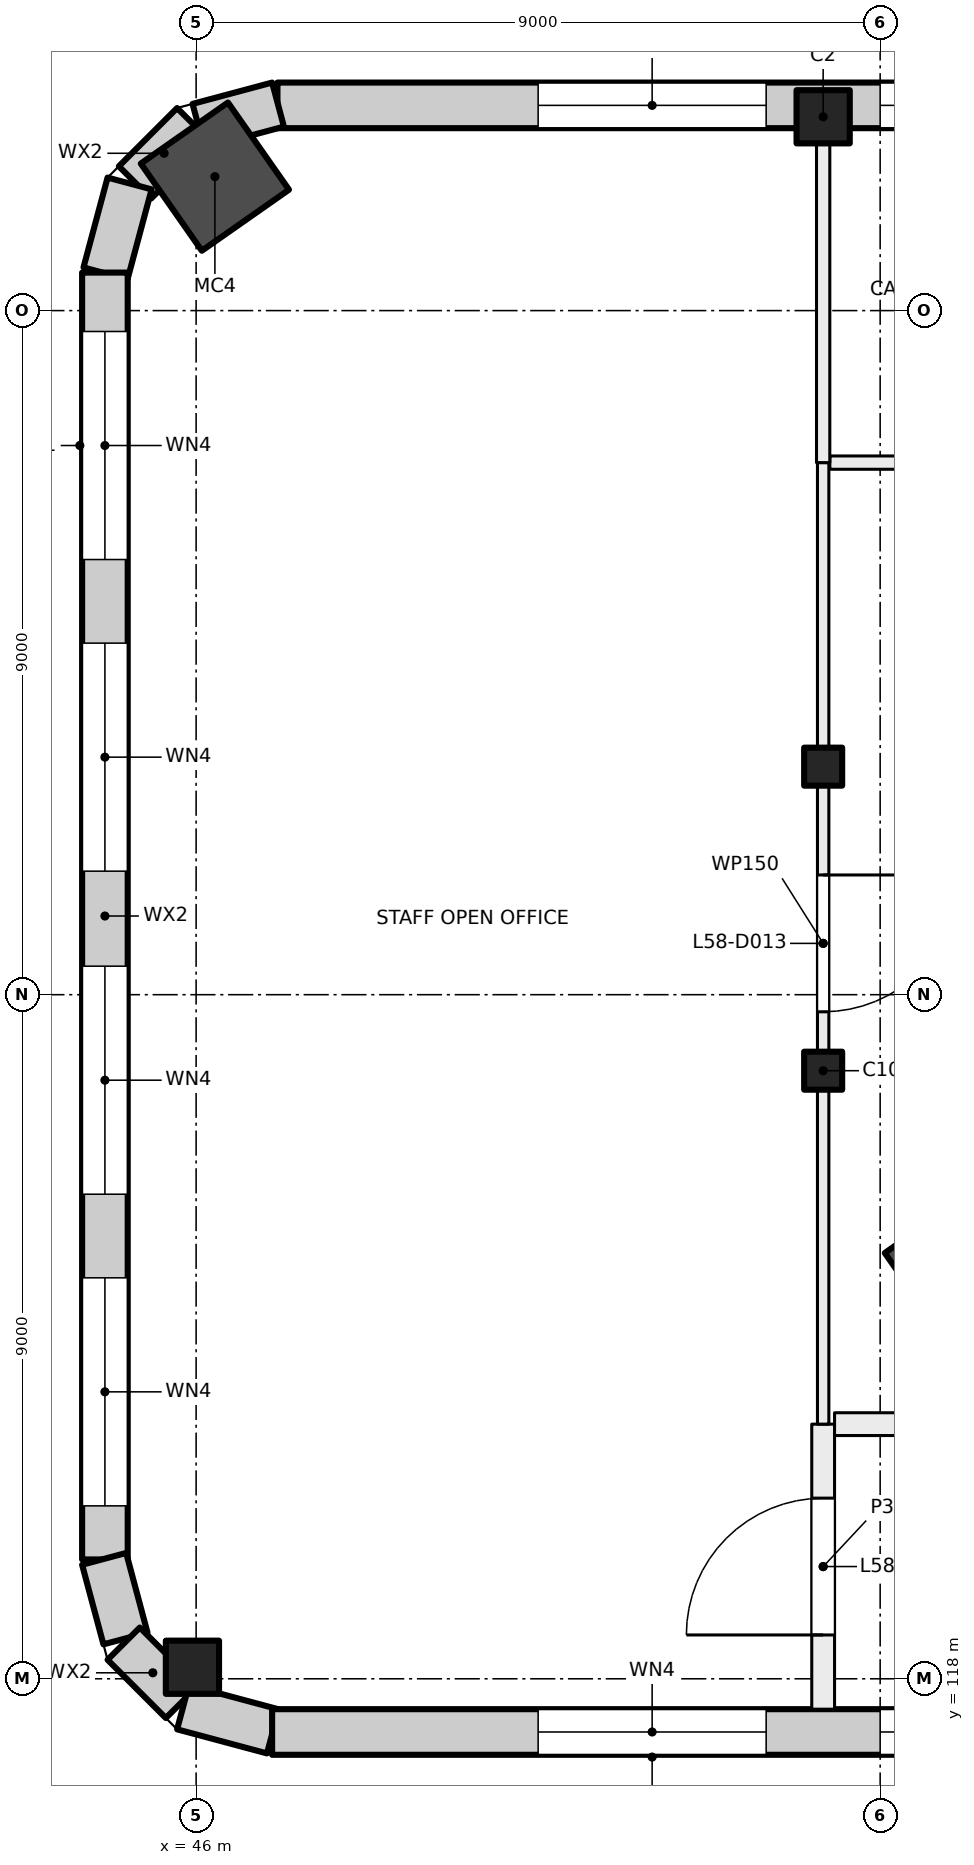
"""IFC4 building model, lengths in metres.
Left out: names, types, materials, properties, quantities, classifications, styles, units other than length and angle.
Written with IfcOpenShell. Run it as: python <this file> out.ifc"""

import sys

from ifc_helpers import new_model, si_unit, direction, frame, frame_2d, origin, origin_2d, place, context, subcontext, project, spatial, rectangle, hollow_rectangle, extrude, element, fill, save


model = new_model("IFC4")
c1 = context("Model", 3, precision=1e-05, world=origin(), true_north=direction((0.0, 1.0)))
c2 = subcontext(c1, "Body", "Model", "MODEL_VIEW")
j1 = project(units=[si_unit("LENGTHUNIT", "METRE"), si_unit("PLANEANGLEUNIT", "RADIAN")], contexts=[c1])
p1 = place(None, origin())
s1 = spatial("IfcSite", under=j1, at=p1, CompositionType="ELEMENT")
p2 = place(p1, origin())
s2 = spatial("IfcBuilding", under=s1, at=p2, CompositionType="ELEMENT")
p3 = place(p2, frame((0.0, 0.0, 245.5)))
s3 = spatial("IfcBuildingStorey", under=s2, at=p3, CompositionType="ELEMENT", Elevation=245.5)
for number, where, z_axis, x_axis in (
    (1, (46.247, 137.762, 0.0), (0.0, 0.0, 1.0), (0.574, -0.819, 0.0)),
    (2, (56.036, 123.43, 0.0), (0.0, 0.0, 1.0), (0.574, -0.819, 0.0)),
):
    element("IfcColumn", number, at=place(p3, frame(where, z_axis=z_axis, x_axis=x_axis)), inside=s3, PredefinedType="COLUMN", context=c2, shape_type="SweptSolid", body=[
        extrude(hollow_rectangle(XDim=1.4, YDim=1.4, WallThickness=0.025, at=origin_2d()), origin(), (0.0, 0.0, 1.0), 4.0),
    ])
for number, where, z_axis, x_axis in (
    (3, (54.25, 130.0, 0.0), (0.0, 0.0, 1.0), (1.0, 0.0, 0.0)),
    (4, (54.25, 126.0, 0.0), (0.0, 0.0, 1.0), (1.0, 0.0, 0.0)),
):
    element("IfcColumn", number, at=place(p3, frame(where, z_axis=z_axis, x_axis=x_axis)), inside=s3, PredefinedType="COLUMN", context=c2, shape_type="SweptSolid", body=[
        extrude(rectangle(XDim=0.5, YDim=0.5, at=origin_2d()), origin(), (0.0, 0.0, 1.0), 4.0),
    ])
for number, where, z_axis, x_axis in (
    (5, (54.25, 138.55, 0.0), (0.0, 0.0, 1.0), (1.0, 0.0, 0.0)),
    (6, (45.952, 118.152, 0.0), (0.0, 0.0, 1.0), (1.0, 0.0, 0.0)),
):
    element("IfcColumn", number, at=place(p3, frame(where, z_axis=z_axis, x_axis=x_axis)), inside=s3, PredefinedType="COLUMN", context=c2, shape_type="SweptSolid", body=[
        extrude(rectangle(XDim=0.7, YDim=0.7, at=origin_2d()), origin(), (0.0, 0.0, 1.0), 4.0),
    ])
p4 = place(p3, frame((47.07, 138.7, 0.0), z_axis=(0.0, 0.0, 1.0), x_axis=(1.0, 0.0, 0.0)))
e7 = element("IfcWall", 7, at=p4, inside=s3, PredefinedType="SOLIDWALL", context=c2, shape_type="SweptSolid", body=[
    extrude(rectangle(XDim=43.91, YDim=0.6, at=frame_2d((21.955, 0.0))), origin(), (0.0, 0.0, 1.0), 3.625),
])
p5 = place(p4, frame((3.43, 0.0, 0.9)))
e8 = element("IfcOpeningElement", 8, at=p5, cuts=e7, PredefinedType="OPENING", context=c2, shape_type="SweptSolid", body=[
    extrude(rectangle(XDim=3.0, YDim=2.4, at=frame_2d((1.5, 1.2))), frame((0.0, 0.31, 0.0), z_axis=(0.0, -1.0, 0.0), x_axis=(1.0, 0.0, 0.0)), (0.0, 0.0, 1.0), 0.62),
])
p6 = place(p4, frame((7.93, 0.0, 0.9)))
e9 = element("IfcOpeningElement", 9, at=p6, cuts=e7, PredefinedType="OPENING", context=c2, shape_type="SweptSolid", body=[
    extrude(rectangle(XDim=3.0, YDim=2.4, at=frame_2d((1.5, 1.2))), frame((0.0, 0.31, 0.0), z_axis=(0.0, -1.0, 0.0), x_axis=(1.0, 0.0, 0.0)), (0.0, 0.0, 1.0), 0.62),
])
p7 = place(p4, frame((12.43, 0.0, 0.9)))
e10 = element("IfcOpeningElement", 10, at=p7, cuts=e7, PredefinedType="OPENING", context=c2, shape_type="SweptSolid", body=[
    extrude(rectangle(XDim=3.0, YDim=2.4, at=frame_2d((1.5, 1.2))), frame((0.0, 0.31, 0.0), z_axis=(0.0, -1.0, 0.0), x_axis=(1.0, 0.0, 0.0)), (0.0, 0.0, 1.0), 0.62),
])
p8 = place(p4, frame((16.93, 0.0, 0.9)))
e11 = element("IfcOpeningElement", 11, at=p8, cuts=e7, PredefinedType="OPENING", context=c2, shape_type="SweptSolid", body=[
    extrude(rectangle(XDim=3.0, YDim=2.4, at=frame_2d((1.5, 1.2))), frame((0.0, 0.31, 0.0), z_axis=(0.0, -1.0, 0.0), x_axis=(1.0, 0.0, 0.0)), (0.0, 0.0, 1.0), 0.62),
])
p9 = place(p4, frame((21.43, 0.0, 0.9)))
e12 = element("IfcOpeningElement", 12, at=p9, cuts=e7, PredefinedType="OPENING", context=c2, shape_type="SweptSolid", body=[
    extrude(rectangle(XDim=3.0, YDim=2.4, at=frame_2d((1.5, 1.2))), frame((0.0, 0.31, 0.0), z_axis=(0.0, -1.0, 0.0), x_axis=(1.0, 0.0, 0.0)), (0.0, 0.0, 1.0), 0.62),
])
p10 = place(p4, frame((25.93, 0.0, 0.9)))
e13 = element("IfcOpeningElement", 13, at=p10, cuts=e7, PredefinedType="OPENING", context=c2, shape_type="SweptSolid", body=[
    extrude(rectangle(XDim=3.0, YDim=2.4, at=frame_2d((1.5, 1.2))), frame((0.0, 0.31, 0.0), z_axis=(0.0, -1.0, 0.0), x_axis=(1.0, 0.0, 0.0)), (0.0, 0.0, 1.0), 0.62),
])
p11 = place(p4, frame((30.43, 0.0, 0.9)))
e14 = element("IfcOpeningElement", 14, at=p11, cuts=e7, PredefinedType="OPENING", context=c2, shape_type="SweptSolid", body=[
    extrude(rectangle(XDim=3.0, YDim=2.4, at=frame_2d((1.5, 1.2))), frame((0.0, 0.31, 0.0), z_axis=(0.0, -1.0, 0.0), x_axis=(1.0, 0.0, 0.0)), (0.0, 0.0, 1.0), 0.62),
])
p12 = place(p4, frame((34.93, 0.0, 0.9)))
e15 = element("IfcOpeningElement", 15, at=p12, cuts=e7, PredefinedType="OPENING", context=c2, shape_type="SweptSolid", body=[
    extrude(rectangle(XDim=3.0, YDim=2.4, at=frame_2d((1.5, 1.2))), frame((0.0, 0.31, 0.0), z_axis=(0.0, -1.0, 0.0), x_axis=(1.0, 0.0, 0.0)), (0.0, 0.0, 1.0), 0.62),
])
p13 = place(p4, frame((39.43, 0.0, 0.9)))
e16 = element("IfcOpeningElement", 16, at=p13, cuts=e7, PredefinedType="OPENING", context=c2, shape_type="SweptSolid", body=[
    extrude(rectangle(XDim=3.0, YDim=2.4, at=frame_2d((1.5, 1.2))), frame((0.0, 0.31, 0.0), z_axis=(0.0, -1.0, 0.0), x_axis=(1.0, 0.0, 0.0)), (0.0, 0.0, 1.0), 0.62),
])
p14 = place(p3, frame((46.031, 138.43, 0.0), z_axis=(0.0, 0.0, 1.0), x_axis=(0.965939004864, 0.25876985698, 0.0)))
e17 = element("IfcWall", 17, at=p14, inside=s3, PredefinedType="SOLIDWALL", context=c2, shape_type="SweptSolid", body=[
    extrude(rectangle(XDim=1.084, YDim=0.6, at=frame_2d((0.542, 0.0))), origin(), (0.0, 0.0, 1.0), 3.625),
])
p15 = place(p3, frame((45.196, 137.686, 0.0), z_axis=(0.0, 0.0, 1.0), x_axis=(0.707106781187, 0.707106781187, 0.0)))
e18 = element("IfcWall", 18, at=p15, inside=s3, PredefinedType="SOLIDWALL", context=c2, shape_type="SweptSolid", body=[
    extrude(rectangle(XDim=1.084, YDim=0.6, at=frame_2d((0.542, 0.0))), origin(), (0.0, 0.0, 1.0), 3.625),
])
p16 = place(p3, frame((44.808, 136.49, 0.0), z_axis=(0.0, 0.0, 1.0), x_axis=(0.258878975098, 0.965909766102, 0.0)))
e19 = element("IfcWall", 19, at=p16, inside=s3, PredefinedType="SOLIDWALL", context=c2, shape_type="SweptSolid", body=[
    extrude(rectangle(XDim=1.224, YDim=0.6, at=frame_2d((0.612, 0.0))), origin(), (0.0, 0.0, 1.0), 3.625),
])
p17 = place(p3, frame((44.8, 119.57, 0.0), z_axis=(0.0, 0.0, 1.0), x_axis=(0.0, 1.0, 0.0)))
e20 = element("IfcWall", 20, at=p17, inside=s3, PredefinedType="SOLIDWALL", context=c2, shape_type="SweptSolid", body=[
    extrude(rectangle(XDim=16.93, YDim=0.6, at=frame_2d((8.465, 0.0))), origin(), (0.0, 0.0, 1.0), 3.625),
])
p18 = place(p17, frame((0.705, 0.0, 0.9)))
e21 = element("IfcOpeningElement", 21, at=p18, cuts=e20, PredefinedType="OPENING", context=c2, shape_type="SweptSolid", body=[
    extrude(rectangle(XDim=3.0, YDim=2.4, at=frame_2d((1.5, 1.2))), frame((0.0, 0.31, 0.0), z_axis=(0.0, -1.0, 0.0), x_axis=(1.0, 0.0, 0.0)), (0.0, 0.0, 1.0), 0.62),
])
p19 = place(p17, frame((4.805, 0.0, 0.9)))
e22 = element("IfcOpeningElement", 22, at=p19, cuts=e20, PredefinedType="OPENING", context=c2, shape_type="SweptSolid", body=[
    extrude(rectangle(XDim=3.0, YDim=2.4, at=frame_2d((1.5, 1.2))), frame((0.0, 0.31, 0.0), z_axis=(0.0, -1.0, 0.0), x_axis=(1.0, 0.0, 0.0)), (0.0, 0.0, 1.0), 0.62),
])
p20 = place(p17, frame((9.055, 0.0, 0.9)))
e23 = element("IfcOpeningElement", 23, at=p20, cuts=e20, PredefinedType="OPENING", context=c2, shape_type="SweptSolid", body=[
    extrude(rectangle(XDim=3.0, YDim=2.4, at=frame_2d((1.5, 1.2))), frame((0.0, 0.31, 0.0), z_axis=(0.0, -1.0, 0.0), x_axis=(1.0, 0.0, 0.0)), (0.0, 0.0, 1.0), 0.62),
])
p21 = place(p17, frame((13.155, 0.0, 0.9)))
e24 = element("IfcOpeningElement", 24, at=p21, cuts=e20, PredefinedType="OPENING", context=c2, shape_type="SweptSolid", body=[
    extrude(rectangle(XDim=3.0, YDim=2.4, at=frame_2d((1.5, 1.2))), frame((0.0, 0.31, 0.0), z_axis=(0.0, -1.0, 0.0), x_axis=(1.0, 0.0, 0.0)), (0.0, 0.0, 1.0), 0.62),
])
p22 = place(p3, frame((45.07, 118.531, 0.0), z_axis=(0.0, 0.0, 1.0), x_axis=(-0.25876985698, 0.965939004864, 0.0)))
e25 = element("IfcWall", 25, at=p22, inside=s3, PredefinedType="SOLIDWALL", context=c2, shape_type="SweptSolid", body=[
    extrude(rectangle(XDim=1.084, YDim=0.6, at=frame_2d((0.542, 0.0))), origin(), (0.0, 0.0, 1.0), 3.625),
])
p23 = place(p3, frame((45.814, 117.696, 0.0), z_axis=(0.0, 0.0, 1.0), x_axis=(-0.707106781187, 0.707106781187, 0.0)))
e26 = element("IfcWall", 26, at=p23, inside=s3, PredefinedType="SOLIDWALL", context=c2, shape_type="SweptSolid", body=[
    extrude(rectangle(XDim=1.084, YDim=0.6, at=frame_2d((0.542, 0.0))), origin(), (0.0, 0.0, 1.0), 3.625),
])
p24 = place(p3, frame((47.01, 117.308, 0.0), z_axis=(0.0, 0.0, 1.0), x_axis=(-0.965909766102, 0.258878975098, 0.0)))
e27 = element("IfcWall", 27, at=p24, inside=s3, PredefinedType="SOLIDWALL", context=c2, shape_type="SweptSolid", body=[
    extrude(rectangle(XDim=1.224, YDim=0.6, at=frame_2d((0.612, 0.0))), origin(), (0.0, 0.0, 1.0), 3.625),
])
p25 = place(p3, frame((90.98, 117.3, 0.0), z_axis=(0.0, 0.0, 1.0), x_axis=(-1.0, 0.0, 0.0)))
e28 = element("IfcWall", 28, at=p25, inside=s3, PredefinedType="SOLIDWALL", context=c2, shape_type="SweptSolid", body=[
    extrude(rectangle(XDim=43.98, YDim=0.6, at=frame_2d((21.99, 0.0))), origin(), (0.0, 0.0, 1.0), 3.625),
])
p26 = place(p25, frame((1.48, 0.0, 0.9)))
e29 = element("IfcOpeningElement", 29, at=p26, cuts=e28, PredefinedType="OPENING", context=c2, shape_type="SweptSolid", body=[
    extrude(rectangle(XDim=3.0, YDim=2.4, at=frame_2d((1.5, 1.2))), frame((0.0, 0.31, 0.0), z_axis=(0.0, -1.0, 0.0), x_axis=(1.0, 0.0, 0.0)), (0.0, 0.0, 1.0), 0.62),
])
p27 = place(p25, frame((5.98, 0.0, 0.9)))
e30 = element("IfcOpeningElement", 30, at=p27, cuts=e28, PredefinedType="OPENING", context=c2, shape_type="SweptSolid", body=[
    extrude(rectangle(XDim=3.0, YDim=2.4, at=frame_2d((1.5, 1.2))), frame((0.0, 0.31, 0.0), z_axis=(0.0, -1.0, 0.0), x_axis=(1.0, 0.0, 0.0)), (0.0, 0.0, 1.0), 0.62),
])
p28 = place(p25, frame((10.48, 0.0, 0.9)))
e31 = element("IfcOpeningElement", 31, at=p28, cuts=e28, PredefinedType="OPENING", context=c2, shape_type="SweptSolid", body=[
    extrude(rectangle(XDim=3.0, YDim=2.4, at=frame_2d((1.5, 1.2))), frame((0.0, 0.31, 0.0), z_axis=(0.0, -1.0, 0.0), x_axis=(1.0, 0.0, 0.0)), (0.0, 0.0, 1.0), 0.62),
])
p29 = place(p25, frame((14.98, 0.0, 0.9)))
e32 = element("IfcOpeningElement", 32, at=p29, cuts=e28, PredefinedType="OPENING", context=c2, shape_type="SweptSolid", body=[
    extrude(rectangle(XDim=3.0, YDim=2.4, at=frame_2d((1.5, 1.2))), frame((0.0, 0.31, 0.0), z_axis=(0.0, -1.0, 0.0), x_axis=(1.0, 0.0, 0.0)), (0.0, 0.0, 1.0), 0.62),
])
p30 = place(p25, frame((19.48, 0.0, 0.9)))
e33 = element("IfcOpeningElement", 33, at=p30, cuts=e28, PredefinedType="OPENING", context=c2, shape_type="SweptSolid", body=[
    extrude(rectangle(XDim=3.0, YDim=2.4, at=frame_2d((1.5, 1.2))), frame((0.0, 0.31, 0.0), z_axis=(0.0, -1.0, 0.0), x_axis=(1.0, 0.0, 0.0)), (0.0, 0.0, 1.0), 0.62),
])
p31 = place(p25, frame((23.98, 0.0, 0.9)))
e34 = element("IfcOpeningElement", 34, at=p31, cuts=e28, PredefinedType="OPENING", context=c2, shape_type="SweptSolid", body=[
    extrude(rectangle(XDim=3.0, YDim=2.4, at=frame_2d((1.5, 1.2))), frame((0.0, 0.31, 0.0), z_axis=(0.0, -1.0, 0.0), x_axis=(1.0, 0.0, 0.0)), (0.0, 0.0, 1.0), 0.62),
])
p32 = place(p25, frame((28.48, 0.0, 0.9)))
e35 = element("IfcOpeningElement", 35, at=p32, cuts=e28, PredefinedType="OPENING", context=c2, shape_type="SweptSolid", body=[
    extrude(rectangle(XDim=3.0, YDim=2.4, at=frame_2d((1.5, 1.2))), frame((0.0, 0.31, 0.0), z_axis=(0.0, -1.0, 0.0), x_axis=(1.0, 0.0, 0.0)), (0.0, 0.0, 1.0), 0.62),
])
p33 = place(p25, frame((32.98, 0.0, 0.9)))
e36 = element("IfcOpeningElement", 36, at=p33, cuts=e28, PredefinedType="OPENING", context=c2, shape_type="SweptSolid", body=[
    extrude(rectangle(XDim=3.0, YDim=2.4, at=frame_2d((1.5, 1.2))), frame((0.0, 0.31, 0.0), z_axis=(0.0, -1.0, 0.0), x_axis=(1.0, 0.0, 0.0)), (0.0, 0.0, 1.0), 0.62),
])
p34 = place(p25, frame((37.48, 0.0, 0.9)))
e37 = element("IfcOpeningElement", 37, at=p34, cuts=e28, PredefinedType="OPENING", context=c2, shape_type="SweptSolid", body=[
    extrude(rectangle(XDim=3.0, YDim=2.4, at=frame_2d((1.5, 1.2))), frame((0.0, 0.31, 0.0), z_axis=(0.0, -1.0, 0.0), x_axis=(1.0, 0.0, 0.0)), (0.0, 0.0, 1.0), 0.62),
])
p35 = place(p3, frame((54.25, 117.6, 0.0), z_axis=(0.0, 0.0, 1.0), x_axis=(0.0, 1.0, 0.0)))
e38 = element("IfcWall", 38, at=p35, inside=s3, PredefinedType="PARTITIONING", context=c2, shape_type="SweptSolid", body=[
    extrude(rectangle(XDim=3.75, YDim=0.3, at=frame_2d((1.875, 0.0))), origin(), (0.0, 0.0, 1.0), 3.625),
])
p36 = place(p35, frame((0.977, 0.0, 0.0)))
e39 = element("IfcOpeningElement", 39, at=p36, cuts=e38, PredefinedType="OPENING", context=c2, shape_type="SweptSolid", body=[
    extrude(rectangle(XDim=1.8, YDim=2.1, at=frame_2d((0.9, 1.05))), frame((0.0, 0.16, 0.0), z_axis=(0.0, -1.0, 0.0), x_axis=(1.0, 0.0, 0.0)), (0.0, 0.0, 1.0), 0.32),
])
p37 = place(p3, frame((54.4, 121.35, 0.0), z_axis=(0.0, 0.0, 1.0), x_axis=(1.0, 0.0, 0.0)))
e40 = element("IfcWall", 40, at=p37, inside=s3, PredefinedType="PARTITIONING", context=c2, shape_type="SweptSolid", body=[
    extrude(rectangle(XDim=31.425, YDim=0.3, at=frame_2d((15.712, 0.0))), origin(), (0.0, 0.0, 1.0), 3.625),
])
p38 = place(p37, frame((17.35, 0.0, 0.0)))
e41 = element("IfcOpeningElement", 41, at=p38, cuts=e40, PredefinedType="OPENING", context=c2, shape_type="SweptSolid", body=[
    extrude(rectangle(XDim=1.0, YDim=2.1, at=frame_2d((0.5, 1.05))), frame((0.0, 0.16, 0.0), z_axis=(0.0, -1.0, 0.0), x_axis=(1.0, 0.0, 0.0)), (0.0, 0.0, 1.0), 0.32),
])
p39 = place(p37, frame((25.95, 0.0, 0.0)))
e42 = element("IfcOpeningElement", 42, at=p39, cuts=e40, PredefinedType="OPENING", context=c2, shape_type="SweptSolid", body=[
    extrude(rectangle(XDim=1.8, YDim=2.1, at=frame_2d((0.9, 1.05))), frame((0.0, 0.16, 0.0), z_axis=(0.0, -1.0, 0.0), x_axis=(1.0, 0.0, 0.0)), (0.0, 0.0, 1.0), 0.32),
])
p40 = place(p37, frame((8.25, 0.0, 0.0)))
e43 = element("IfcOpeningElement", 43, at=p40, cuts=e40, PredefinedType="OPENING", context=c2, shape_type="SweptSolid", body=[
    extrude(rectangle(XDim=1.2, YDim=2.1, at=frame_2d((0.6, 1.05))), frame((0.0, 0.16, 0.0), z_axis=(0.0, -1.0, 0.0), x_axis=(1.0, 0.0, 0.0)), (0.0, 0.0, 1.0), 0.32),
])
p41 = place(p3, frame((54.25, 134.0, 0.0), z_axis=(0.0, 0.0, 1.0), x_axis=(0.0, -1.0, 0.0)))
e44 = element("IfcWall", 44, at=p41, inside=s3, PredefinedType="PARTITIONING", context=c2, shape_type="SweptSolid", body=[
    extrude(rectangle(XDim=12.65, YDim=0.15, at=frame_2d((6.325, 0.0))), origin(), (0.0, 0.0, 1.0), 3.625),
])
p42 = place(p41, frame((5.425, 0.0, 0.0)))
e45 = element("IfcOpeningElement", 45, at=p42, cuts=e44, PredefinedType="OPENING", context=c2, shape_type="SweptSolid", body=[
    extrude(rectangle(XDim=1.8, YDim=2.1, at=frame_2d((0.9, 1.05))), frame((0.0, 0.085, 0.0), z_axis=(0.0, -1.0, 0.0), x_axis=(1.0, 0.0, 0.0)), (0.0, 0.0, 1.0), 0.17),
])
p43 = place(p3, frame((63.162, 134.0, 0.0), z_axis=(0.0, 0.0, 1.0), x_axis=(-1.0, 0.0, 0.0)))
e46 = element("IfcWall", 46, at=p43, inside=s3, PredefinedType="PARTITIONING", context=c2, shape_type="SweptSolid", body=[
    extrude(rectangle(XDim=8.824, YDim=0.175, at=frame_2d((4.412, 0.0))), origin(), (0.0, 0.0, 1.0), 3.625),
])
p44 = place(p43, frame((3.812, 0.0, 0.0)))
e47 = element("IfcOpeningElement", 47, at=p44, cuts=e46, PredefinedType="OPENING", context=c2, shape_type="SweptSolid", body=[
    extrude(rectangle(XDim=1.2, YDim=2.1, at=frame_2d((0.6, 1.05))), frame((0.0, 0.097, 0.0), z_axis=(0.0, -1.0, 0.0), x_axis=(1.0, 0.0, 0.0)), (0.0, 0.0, 1.0), 0.195),
])
p45 = place(p3, frame((54.25, 138.4, 0.0), z_axis=(0.0, 0.0, 1.0), x_axis=(0.0, -1.0, 0.0)))
e48 = element("IfcWall", 48, at=p45, inside=s3, PredefinedType="PARTITIONING", context=c2, shape_type="SweptSolid", body=[
    extrude(rectangle(XDim=4.4, YDim=0.175, at=frame_2d((2.2, 0.0))), origin(), (0.0, 0.0, 1.0), 3.625),
])
p46 = place(p5, origin())
e49 = element("IfcWindow", 49, at=p46, inside=s3, PartitioningType="SINGLE_PANEL", PredefinedType="WINDOW", context=c2, shape_type="SweptSolid", body=[
    extrude(rectangle(XDim=3.0, YDim=2.4, at=frame_2d((1.5, 1.2))), frame((0.0, 0.03, 0.0), z_axis=(0.0, -1.0, 0.0), x_axis=(1.0, 0.0, 0.0)), (0.0, 0.0, 1.0), 0.06),
])
fill(e8, e49)
p47 = place(p6, origin())
e50 = element("IfcWindow", 50, at=p47, inside=s3, PartitioningType="SINGLE_PANEL", PredefinedType="WINDOW", context=c2, shape_type="SweptSolid", body=[
    extrude(rectangle(XDim=3.0, YDim=2.4, at=frame_2d((1.5, 1.2))), frame((0.0, 0.03, 0.0), z_axis=(0.0, -1.0, 0.0), x_axis=(1.0, 0.0, 0.0)), (0.0, 0.0, 1.0), 0.06),
])
fill(e9, e50)
p48 = place(p18, origin())
e51 = element("IfcWindow", 51, at=p48, inside=s3, PartitioningType="SINGLE_PANEL", PredefinedType="WINDOW", context=c2, shape_type="SweptSolid", body=[
    extrude(rectangle(XDim=3.0, YDim=2.4, at=frame_2d((1.5, 1.2))), frame((0.0, 0.03, 0.0), z_axis=(0.0, -1.0, 0.0), x_axis=(1.0, 0.0, 0.0)), (0.0, 0.0, 1.0), 0.06),
])
fill(e21, e51)
p49 = place(p19, origin())
e52 = element("IfcWindow", 52, at=p49, inside=s3, PartitioningType="SINGLE_PANEL", PredefinedType="WINDOW", context=c2, shape_type="SweptSolid", body=[
    extrude(rectangle(XDim=3.0, YDim=2.4, at=frame_2d((1.5, 1.2))), frame((0.0, 0.03, 0.0), z_axis=(0.0, -1.0, 0.0), x_axis=(1.0, 0.0, 0.0)), (0.0, 0.0, 1.0), 0.06),
])
fill(e22, e52)
p50 = place(p20, origin())
e53 = element("IfcWindow", 53, at=p50, inside=s3, PartitioningType="SINGLE_PANEL", PredefinedType="WINDOW", context=c2, shape_type="SweptSolid", body=[
    extrude(rectangle(XDim=3.0, YDim=2.4, at=frame_2d((1.5, 1.2))), frame((0.0, 0.03, 0.0), z_axis=(0.0, -1.0, 0.0), x_axis=(1.0, 0.0, 0.0)), (0.0, 0.0, 1.0), 0.06),
])
fill(e23, e53)
p51 = place(p21, origin())
e54 = element("IfcWindow", 54, at=p51, inside=s3, PartitioningType="SINGLE_PANEL", PredefinedType="WINDOW", context=c2, shape_type="SweptSolid", body=[
    extrude(rectangle(XDim=3.0, YDim=2.4, at=frame_2d((1.5, 1.2))), frame((0.0, 0.03, 0.0), z_axis=(0.0, -1.0, 0.0), x_axis=(1.0, 0.0, 0.0)), (0.0, 0.0, 1.0), 0.06),
])
fill(e24, e54)
p52 = place(p33, origin())
e55 = element("IfcWindow", 55, at=p52, inside=s3, PartitioningType="SINGLE_PANEL", PredefinedType="WINDOW", context=c2, shape_type="SweptSolid", body=[
    extrude(rectangle(XDim=3.0, YDim=2.4, at=frame_2d((1.5, 1.2))), frame((0.0, 0.03, 0.0), z_axis=(0.0, -1.0, 0.0), x_axis=(1.0, 0.0, 0.0)), (0.0, 0.0, 1.0), 0.06),
])
fill(e36, e55)
p53 = place(p34, origin())
e56 = element("IfcWindow", 56, at=p53, inside=s3, PartitioningType="SINGLE_PANEL", PredefinedType="WINDOW", context=c2, shape_type="SweptSolid", body=[
    extrude(rectangle(XDim=3.0, YDim=2.4, at=frame_2d((1.5, 1.2))), frame((0.0, 0.03, 0.0), z_axis=(0.0, -1.0, 0.0), x_axis=(1.0, 0.0, 0.0)), (0.0, 0.0, 1.0), 0.06),
])
fill(e37, e56)
p54 = place(p36, origin())
e57 = element("IfcDoor", 57, at=p54, inside=s3, OperationType="DOUBLE_DOOR_SINGLE_SWING", PredefinedType="DOOR", context=c2, shape_type="SweptSolid", body=[
    extrude(rectangle(XDim=1.8, YDim=2.1, at=frame_2d((0.9, 1.05))), frame((0.0, 0.025, 0.0), z_axis=(0.0, -1.0, 0.0), x_axis=(1.0, 0.0, 0.0)), (0.0, 0.0, 1.0), 0.05),
])
fill(e39, e57)
p55 = place(p42, origin())
e58 = element("IfcDoor", 58, at=p55, inside=s3, OperationType="DOUBLE_DOOR_SINGLE_SWING", PredefinedType="DOOR", context=c2, shape_type="SweptSolid", body=[
    extrude(rectangle(XDim=1.8, YDim=2.1, at=frame_2d((0.9, 1.05))), frame((0.0, 0.025, 0.0), z_axis=(0.0, -1.0, 0.0), x_axis=(1.0, 0.0, 0.0)), (0.0, 0.0, 1.0), 0.05),
])
fill(e45, e58)
save(model, sys.argv[1])
